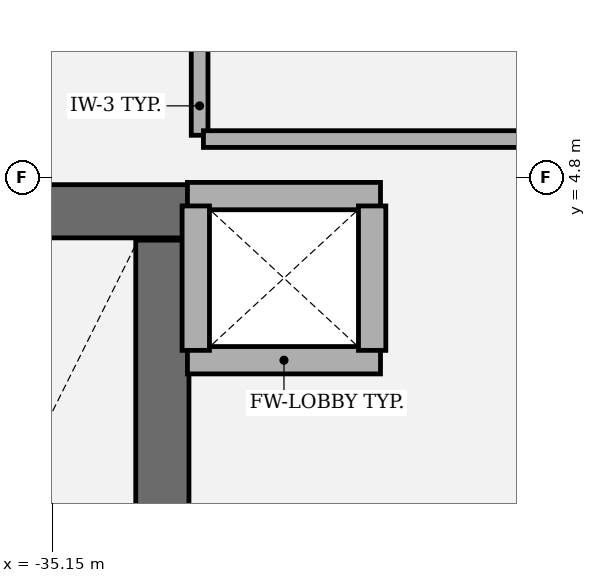
"""IFC4 building model, lengths in metres.
Left out: names, types, materials, properties, quantities, classifications, styles, units other than length and angle.
Written with IfcOpenShell. Run it as: python <this file> out.ifc"""

import sys

from ifc_helpers import new_model, si_unit, direction, frame, frame_2d, origin, place, context, subcontext, project, spatial, rectangle, extrude, element, save


model = new_model("IFC4")
c1 = context("Model", 3, precision=1e-05, world=origin(), true_north=direction((0.0, 1.0)))
c2 = subcontext(c1, "Body", "Model", "MODEL_VIEW")
j1 = project(units=[si_unit("LENGTHUNIT", "METRE"), si_unit("PLANEANGLEUNIT", "RADIAN")], contexts=[c1])
p1 = place(None, origin())
s1 = spatial("IfcSite", under=j1, at=p1, CompositionType="ELEMENT")
p2 = place(p1, origin())
s2 = spatial("IfcBuilding", under=s1, at=p2, CompositionType="ELEMENT")
p3 = place(p2, frame((0.0, 0.0, 285.0)))
s3 = spatial("IfcBuildingStorey", under=s2, at=p3, CompositionType="ELEMENT", Elevation=285.0)
p4 = place(p3, frame((-34.25, 4.575, 0.0), z_axis=(0.0, 0.0, 1.0), x_axis=(-1.0, 0.0, 0.0)))
e1 = element("IfcWall", 1, at=p4, inside=s3, PredefinedType="SHEAR", context=c2, shape_type="SweptSolid", body=[
    extrude(rectangle(XDim=4.21, YDim=0.35, at=frame_2d((2.105, 0.0))), origin(), (0.0, 0.0, 1.0), 3.91),
])
p5 = place(p3, frame((-34.425, -4.385, 0.0), z_axis=(0.0, 0.0, 1.0), x_axis=(0.0, 1.0, 0.0)))
e2 = element("IfcWall", 2, at=p5, inside=s3, PredefinedType="SHEAR", context=c2, shape_type="SweptSolid", body=[
    extrude(rectangle(XDim=8.77, YDim=0.35, at=frame_2d((4.385, 0.0))), origin(), (0.0, 0.0, 1.0), 3.91),
])
for number, where, z_axis, x_axis in (
    (3, (-32.99, 3.595, 0.0), (0.0, 0.0, 1.0), (-1.0, 0.0, 0.0)),
    (4, (-34.26, 4.675, 0.0), (0.0, 0.0, 1.0), (1.0, 0.0, 0.0)),
):
    element("IfcWall", number, at=place(p3, frame(where, z_axis=z_axis, x_axis=x_axis)), inside=s3, PredefinedType="PARTITIONING", context=c2, shape_type="SweptSolid", body=[
        extrude(rectangle(XDim=1.27, YDim=0.18, at=frame_2d((0.635, 0.0))), origin(), (0.0, 0.0, 1.0), 3.91),
    ])
for number, where, z_axis, x_axis in (
    (5, (-34.205, 3.66, 0.0), (0.0, 0.0, 1.0), (0.0, 1.0, 0.0)),
    (6, (-33.045, 4.61, 0.0), (0.0, 0.0, 1.0), (0.0, -1.0, 0.0)),
):
    element("IfcWall", number, at=place(p3, frame(where, z_axis=z_axis, x_axis=x_axis)), inside=s3, PredefinedType="PARTITIONING", context=c2, shape_type="SweptSolid", body=[
        extrude(rectangle(XDim=0.95, YDim=0.18, at=frame_2d((0.475, 0.0))), origin(), (0.0, 0.0, 1.0), 3.91),
    ])
p6 = place(p3, frame((-34.18, 8.225, 0.0), z_axis=(0.0, 0.0, 1.0), x_axis=(0.0, -1.0, 0.0)))
e7 = element("IfcWall", 7, at=p6, inside=s3, PredefinedType="PARTITIONING", context=c2, shape_type="SweptSolid", body=[
    extrude(rectangle(XDim=3.15, YDim=0.11, at=frame_2d((1.575, 0.0))), origin(), (0.0, 0.0, 1.0), 3.91),
])
p7 = place(p6, frame((1.135, 0.0, 0.0)))
e8 = element("IfcOpeningElement", 8, at=p7, cuts=e7, PredefinedType="OPENING", context=c2, shape_type="SweptSolid", body=[
    extrude(rectangle(XDim=0.88, YDim=2.1, at=frame_2d((0.44, 1.05))), frame((0.0, 0.065, 0.0), z_axis=(0.0, -1.0, 0.0), x_axis=(1.0, 0.0, 0.0)), (0.0, 0.0, 1.0), 0.13),
])
p8 = place(p3, frame((-34.155, 5.05, 0.0), z_axis=(0.0, 0.0, 1.0), x_axis=(1.0, 0.0, 0.0)))
e9 = element("IfcWall", 9, at=p8, inside=s3, PredefinedType="PARTITIONING", context=c2, shape_type="SweptSolid", body=[
    extrude(rectangle(XDim=3.19, YDim=0.11, at=frame_2d((1.595, 0.0))), origin(), (0.0, 0.0, 1.0), 3.91),
])
save(model, sys.argv[1])
